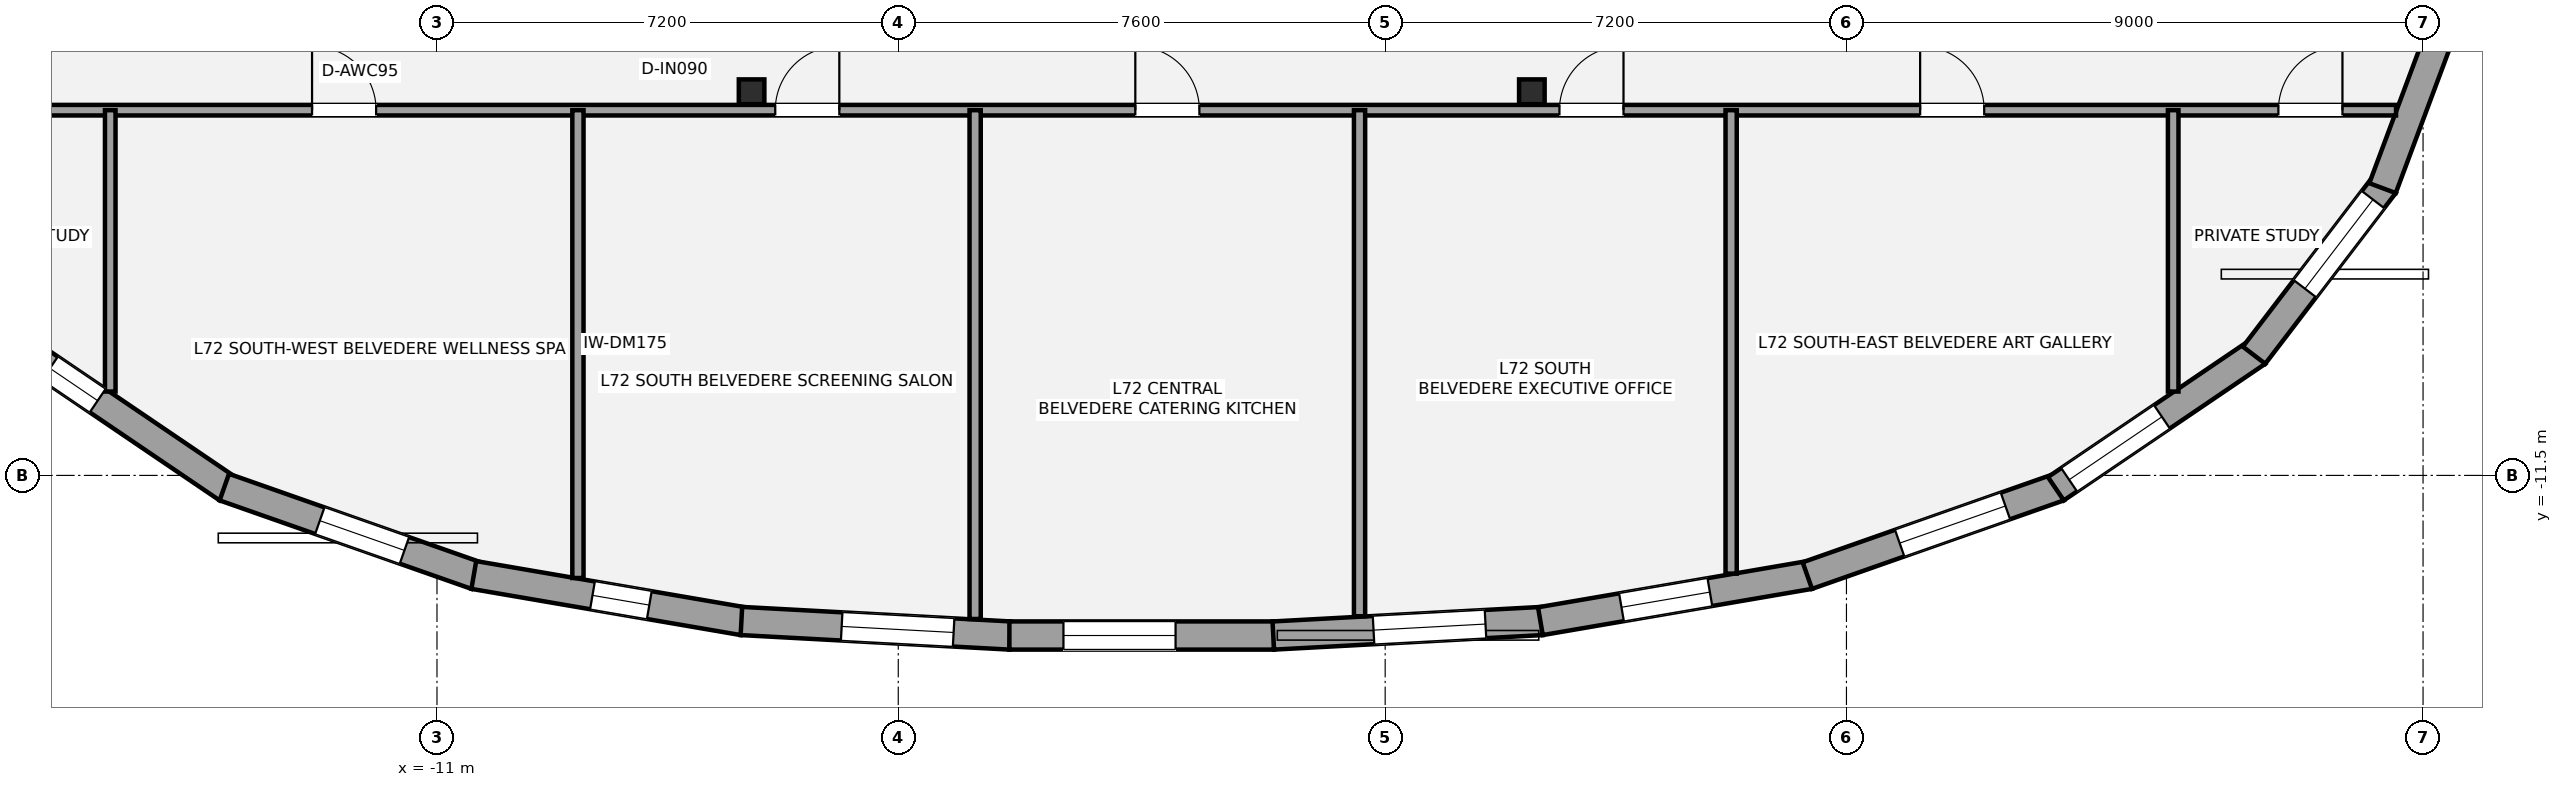
"""IFC4 building model, lengths in metres.
Left out: names, types, materials, properties, quantities, classifications, styles, units other than length and angle.
Written with IfcOpenShell. Run it as: python <this file> out.ifc"""

import sys

from ifc_helpers import new_model, si_unit, direction, frame, frame_2d, origin, origin_2d, place, context, subcontext, project, spatial, rectangle, i_section, extrude, element, fill, save


model = new_model("IFC4")
c1 = context("Model", 3, precision=1e-05, world=origin(), true_north=direction((0.0, 1.0)))
c2 = subcontext(c1, "Body", "Model", "MODEL_VIEW")
j1 = project(units=[si_unit("LENGTHUNIT", "METRE"), si_unit("PLANEANGLEUNIT", "RADIAN")], contexts=[c1])
p1 = place(None, origin())
s1 = spatial("IfcSite", under=j1, at=p1, CompositionType="ELEMENT")
p2 = place(p1, origin())
s2 = spatial("IfcBuilding", under=s1, at=p2, CompositionType="ELEMENT")
p3 = place(p2, frame((0.0, 0.0, 254.1)))
s3 = spatial("IfcBuildingStorey", under=s2, at=p3, CompositionType="ELEMENT", Elevation=254.1)
for number, where, z_axis, x_axis in (
    (1, (-6.09, -5.513, 0.0), (0.0, 0.0, 1.0), (1.0, 0.0, 0.0)),
    (2, (6.09, -5.513, 0.0), (0.0, 0.0, 1.0), (1.0, 0.0, 0.0)),
):
    element("IfcColumn", number, at=place(p3, frame(where, z_axis=z_axis, x_axis=x_axis)), inside=s3, PredefinedType="COLUMN", context=c2, shape_type="SweptSolid", body=[
        extrude(i_section(OverallWidth=0.399, OverallDepth=0.387, WebThickness=0.021, FlangeThickness=0.033, at=origin_2d()), origin(), (0.0, 0.0, 1.0), 3.15),
    ])
p4 = place(p3, frame((-14.269, -11.708, 0.0), z_axis=(0.0, 0.0, 1.0), x_axis=(-0.827695346596, 0.561177702001, 0.0)))
e3 = element("IfcWall", 3, at=p4, inside=s3, PredefinedType="STANDARD", context=c2, shape_type="SweptSolid", body=[
    extrude(rectangle(XDim=3.8, YDim=0.44, at=frame_2d((1.9, 0.0))), origin(), (0.0, 0.0, 1.0), 2.336),
])
p5 = place(p4, frame((2.449, 0.0, 0.58)))
e4 = element("IfcOpeningElement", 4, at=p5, cuts=e3, PredefinedType="OPENING", context=c2, shape_type="SweptSolid", body=[
    extrude(rectangle(XDim=0.9, YDim=1.35, at=frame_2d((0.45, 0.675))), frame((0.0, 0.23, 0.0), z_axis=(0.0, -1.0, 0.0), x_axis=(1.0, 0.0, 0.0)), (0.0, 0.0, 1.0), 0.46),
])
p6 = place(p3, frame((-10.389, -13.063, 0.0), z_axis=(0.0, 0.0, 1.0), x_axis=(-0.943461130408, 0.331483175152, 0.0)))
e5 = element("IfcWall", 5, at=p6, inside=s3, PredefinedType="STANDARD", context=c2, shape_type="SweptSolid", body=[
    extrude(rectangle(XDim=4.166, YDim=0.44, at=frame_2d((2.083, 0.0))), origin(), (0.0, 0.0, 1.0), 2.336),
])
p7 = place(p6, frame((1.186, 0.0, 0.55)))
e6 = element("IfcOpeningElement", 6, at=p7, cuts=e5, PredefinedType="OPENING", context=c2, shape_type="SweptSolid", body=[
    extrude(rectangle(XDim=1.4, YDim=1.55, at=frame_2d((0.7, 0.775))), frame((0.0, 0.23, 0.0), z_axis=(0.0, -1.0, 0.0), x_axis=(1.0, 0.0, 0.0)), (0.0, 0.0, 1.0), 0.46),
])
p8 = place(p3, frame((-6.223, -13.775, 0.0), z_axis=(0.0, 0.0, 1.0), x_axis=(-0.985601268854, 0.169086187587, 0.0)))
e7 = element("IfcWall", 7, at=p8, inside=s3, PredefinedType="STANDARD", context=c2, shape_type="SweptSolid", body=[
    extrude(rectangle(XDim=4.264, YDim=0.44, at=frame_2d((2.132, 0.0))), origin(), (0.0, 0.0, 1.0), 2.336),
])
p9 = place(p8, frame((1.484, 0.0, 0.58)))
e8 = element("IfcOpeningElement", 8, at=p9, cuts=e7, PredefinedType="OPENING", context=c2, shape_type="SweptSolid", body=[
    extrude(rectangle(XDim=0.9, YDim=1.35, at=frame_2d((0.45, 0.675))), frame((0.0, 0.23, 0.0), z_axis=(0.0, -1.0, 0.0), x_axis=(1.0, 0.0, 0.0)), (0.0, 0.0, 1.0), 0.46),
])
p10 = place(p3, frame((-2.054, -13.999, 0.0), z_axis=(0.0, 0.0, 1.0), x_axis=(-0.998541341871, 0.05399248627, 0.0)))
e9 = element("IfcWall", 9, at=p10, inside=s3, PredefinedType="STANDARD", context=c2, shape_type="SweptSolid", body=[
    extrude(rectangle(XDim=4.201, YDim=0.44, at=frame_2d((2.1, 0.0))), origin(), (0.0, 0.0, 1.0), 2.336),
])
p11 = place(p10, frame((0.884, 0.0, 0.55)))
e10 = element("IfcOpeningElement", 10, at=p11, cuts=e9, PredefinedType="OPENING", context=c2, shape_type="SweptSolid", body=[
    extrude(rectangle(XDim=1.75, YDim=1.55, at=frame_2d((0.875, 0.775))), frame((0.0, 0.23, 0.0), z_axis=(0.0, -1.0, 0.0), x_axis=(1.0, 0.0, 0.0)), (0.0, 0.0, 1.0), 0.46),
])
p12 = place(p3, frame((2.065, -13.999, 0.0), z_axis=(0.0, 0.0, 1.0), x_axis=(-1.0, 0.0, 0.0)))
e11 = element("IfcWall", 11, at=p12, inside=s3, PredefinedType="STANDARD", context=c2, shape_type="SweptSolid", body=[
    extrude(rectangle(XDim=4.131, YDim=0.44, at=frame_2d((2.065, 0.0))), origin(), (0.0, 0.0, 1.0), 2.336),
])
p13 = place(p12, frame((1.537, 0.0, 0.55)))
e12 = element("IfcOpeningElement", 12, at=p13, cuts=e11, PredefinedType="OPENING", context=c2, shape_type="SweptSolid", body=[
    extrude(rectangle(XDim=1.75, YDim=1.55, at=frame_2d((0.875, 0.775))), frame((0.0, 0.23, 0.0), z_axis=(0.0, -1.0, 0.0), x_axis=(1.0, 0.0, 0.0)), (0.0, 0.0, 1.0), 0.46),
])
p14 = place(p3, frame((6.248, -13.772, 0.0), z_axis=(0.0, 0.0, 1.0), x_axis=(-0.998541341871, -0.05399248627, 0.0)))
e13 = element("IfcWall", 13, at=p14, inside=s3, PredefinedType="STANDARD", context=c2, shape_type="SweptSolid", body=[
    extrude(rectangle(XDim=4.201, YDim=0.44, at=frame_2d((2.1, 0.0))), origin(), (0.0, 0.0, 1.0), 2.336),
])
p15 = place(p14, frame((0.884, 0.0, 0.55)))
e14 = element("IfcOpeningElement", 14, at=p15, cuts=e13, PredefinedType="OPENING", context=c2, shape_type="SweptSolid", body=[
    extrude(rectangle(XDim=1.75, YDim=1.55, at=frame_2d((0.875, 0.775))), frame((0.0, 0.23, 0.0), z_axis=(0.0, -1.0, 0.0), x_axis=(1.0, 0.0, 0.0)), (0.0, 0.0, 1.0), 0.46),
])
p16 = place(p3, frame((10.425, -13.054, 0.0), z_axis=(0.0, 0.0, 1.0), x_axis=(-0.985601268854, -0.169086187587, 0.0)))
e15 = element("IfcWall", 15, at=p16, inside=s3, PredefinedType="STANDARD", context=c2, shape_type="SweptSolid", body=[
    extrude(rectangle(XDim=4.264, YDim=0.44, at=frame_2d((2.132, 0.0))), origin(), (0.0, 0.0, 1.0), 2.336),
])
p17 = place(p16, frame((1.58, 0.0, 0.55)))
e16 = element("IfcOpeningElement", 16, at=p17, cuts=e15, PredefinedType="OPENING", context=c2, shape_type="SweptSolid", body=[
    extrude(rectangle(XDim=1.4, YDim=1.55, at=frame_2d((0.7, 0.775))), frame((0.0, 0.23, 0.0), z_axis=(0.0, -1.0, 0.0), x_axis=(1.0, 0.0, 0.0)), (0.0, 0.0, 1.0), 0.46),
])
p18 = place(p3, frame((14.32, -11.683, 0.0), z_axis=(0.0, 0.0, 1.0), x_axis=(-0.943461130408, -0.331483175152, 0.0)))
e17 = element("IfcWall", 17, at=p18, inside=s3, PredefinedType="STANDARD", context=c2, shape_type="SweptSolid", body=[
    extrude(rectangle(XDim=4.166, YDim=0.44, at=frame_2d((2.083, 0.0))), origin(), (0.0, 0.0, 1.0), 2.336),
])
p19 = place(p18, frame((0.888, 0.0, 0.55)))
e18 = element("IfcOpeningElement", 18, at=p19, cuts=e17, PredefinedType="OPENING", context=c2, shape_type="SweptSolid", body=[
    extrude(rectangle(XDim=1.75, YDim=1.55, at=frame_2d((0.875, 0.775))), frame((0.0, 0.23, 0.0), z_axis=(0.0, -1.0, 0.0), x_axis=(1.0, 0.0, 0.0)), (0.0, 0.0, 1.0), 0.46),
])
p20 = place(p3, frame((17.414, -9.576, 0.0), z_axis=(0.0, 0.0, 1.0), x_axis=(-0.827695346596, -0.561177702001, 0.0)))
e19 = element("IfcWall", 19, at=p20, inside=s3, PredefinedType="STANDARD", context=c2, shape_type="SweptSolid", body=[
    extrude(rectangle(XDim=3.8, YDim=0.44, at=frame_2d((1.9, 0.0))), origin(), (0.0, 0.0, 1.0), 2.336),
])
p21 = place(p20, frame((1.8, 0.0, 0.55)))
e20 = element("IfcOpeningElement", 20, at=p21, cuts=e19, PredefinedType="OPENING", context=c2, shape_type="SweptSolid", body=[
    extrude(rectangle(XDim=1.75, YDim=1.55, at=frame_2d((0.875, 0.775))), frame((0.0, 0.23, 0.0), z_axis=(0.0, -1.0, 0.0), x_axis=(1.0, 0.0, 0.0)), (0.0, 0.0, 1.0), 0.46),
])
p22 = place(p3, frame((19.399, -6.96, 0.0), z_axis=(0.0, 0.0, 1.0), x_axis=(-0.607266352304, -0.794498318034, 0.0)))
e21 = element("IfcWall", 21, at=p22, inside=s3, PredefinedType="STANDARD", context=c2, shape_type="SweptSolid", body=[
    extrude(rectangle(XDim=3.354, YDim=0.44, at=frame_2d((1.677, 0.0))), origin(), (0.0, 0.0, 1.0), 2.336),
])
p23 = place(p22, frame((0.296, 0.0, 0.55)))
e22 = element("IfcOpeningElement", 22, at=p23, cuts=e21, PredefinedType="OPENING", context=c2, shape_type="SweptSolid", body=[
    extrude(rectangle(XDim=1.75, YDim=1.55, at=frame_2d((0.875, 0.775))), frame((0.0, 0.23, 0.0), z_axis=(0.0, -1.0, 0.0), x_axis=(1.0, 0.0, 0.0)), (0.0, 0.0, 1.0), 0.46),
])
p24 = place(p3, frame((20.431, -4.167, 0.0), z_axis=(0.0, 0.0, 1.0), x_axis=(-0.349627332297, -0.936888856007, 0.0)))
e23 = element("IfcWall", 23, at=p24, inside=s3, PredefinedType="STANDARD", context=c2, shape_type="SweptSolid", body=[
    extrude(rectangle(XDim=3.041, YDim=0.44, at=frame_2d((1.521, 0.0))), origin(), (0.0, 0.0, 1.0), 2.336),
])
p25 = place(p3, frame((-19.578, -5.8, 0.0), z_axis=(0.0, 0.0, 1.0), x_axis=(1.0, 0.0, 0.0)))
e24 = element("IfcWall", 24, at=p25, inside=s3, PredefinedType="PARTITIONING", context=c2, shape_type="SweptSolid", body=[
    extrude(rectangle(XDim=39.157, YDim=0.165, at=frame_2d((19.578, 0.0))), origin(), (0.0, 0.0, 1.0), 2.423),
])
p26 = place(p25, frame((1.076, 0.0, 0.0)))
e25 = element("IfcOpeningElement", 25, at=p26, cuts=e24, PredefinedType="OPENING", context=c2, shape_type="SweptSolid", body=[
    extrude(rectangle(XDim=1.0, YDim=2.15, at=frame_2d((0.5, 1.075))), frame((0.0, 0.093, 0.0), z_axis=(0.0, -1.0, 0.0), x_axis=(1.0, 0.0, 0.0)), (0.0, 0.0, 1.0), 0.185),
])
p27 = place(p25, frame((37.32, 0.0, 0.0)))
e26 = element("IfcOpeningElement", 26, at=p27, cuts=e24, PredefinedType="OPENING", context=c2, shape_type="SweptSolid", body=[
    extrude(rectangle(XDim=1.0, YDim=2.15, at=frame_2d((0.5, 1.075))), frame((0.0, 0.093, 0.0), z_axis=(0.0, -1.0, 0.0), x_axis=(1.0, 0.0, 0.0)), (0.0, 0.0, 1.0), 0.185),
])
p28 = place(p25, frame((6.628, 0.0, 0.0)))
e27 = element("IfcOpeningElement", 27, at=p28, cuts=e24, PredefinedType="OPENING", context=c2, shape_type="SweptSolid", body=[
    extrude(rectangle(XDim=1.0, YDim=2.15, at=frame_2d((0.5, 1.075))), frame((0.0, 0.093, 0.0), z_axis=(0.0, -1.0, 0.0), x_axis=(1.0, 0.0, 0.0)), (0.0, 0.0, 1.0), 0.185),
])
p29 = place(p25, frame((13.858, 0.0, 0.0)))
e28 = element("IfcOpeningElement", 28, at=p29, cuts=e24, PredefinedType="OPENING", context=c2, shape_type="SweptSolid", body=[
    extrude(rectangle(XDim=1.0, YDim=2.15, at=frame_2d((0.5, 1.075))), frame((0.0, 0.093, 0.0), z_axis=(0.0, -1.0, 0.0), x_axis=(1.0, 0.0, 0.0)), (0.0, 0.0, 1.0), 0.185),
])
p30 = place(p25, frame((19.478, 0.0, 0.0)))
e29 = element("IfcOpeningElement", 29, at=p30, cuts=e24, PredefinedType="OPENING", context=c2, shape_type="SweptSolid", body=[
    extrude(rectangle(XDim=1.0, YDim=2.15, at=frame_2d((0.5, 1.075))), frame((0.0, 0.093, 0.0), z_axis=(0.0, -1.0, 0.0), x_axis=(1.0, 0.0, 0.0)), (0.0, 0.0, 1.0), 0.185),
])
p31 = place(p25, frame((26.098, 0.0, 0.0)))
e30 = element("IfcOpeningElement", 30, at=p31, cuts=e24, PredefinedType="OPENING", context=c2, shape_type="SweptSolid", body=[
    extrude(rectangle(XDim=1.0, YDim=2.15, at=frame_2d((0.5, 1.075))), frame((0.0, 0.093, 0.0), z_axis=(0.0, -1.0, 0.0), x_axis=(1.0, 0.0, 0.0)), (0.0, 0.0, 1.0), 0.185),
])
p32 = place(p25, frame((31.728, 0.0, 0.0)))
e31 = element("IfcOpeningElement", 31, at=p32, cuts=e24, PredefinedType="OPENING", context=c2, shape_type="SweptSolid", body=[
    extrude(rectangle(XDim=1.0, YDim=2.15, at=frame_2d((0.5, 1.075))), frame((0.0, 0.093, 0.0), z_axis=(0.0, -1.0, 0.0), x_axis=(1.0, 0.0, 0.0)), (0.0, 0.0, 1.0), 0.185),
])
for number, where, z_axis, x_axis in (
    (32, (-16.1, -10.191, 0.0), (0.0, 0.0, 1.0), (0.0, 1.0, 0.0)),
    (33, (16.1, -10.191, 0.0), (0.0, 0.0, 1.0), (0.0, 1.0, 0.0)),
):
    element("IfcWall", number, at=place(p3, frame(where, z_axis=z_axis, x_axis=x_axis)), inside=s3, PredefinedType="PARTITIONING", context=c2, shape_type="SweptSolid", body=[
        extrude(rectangle(XDim=4.391, YDim=0.165, at=frame_2d((2.196, 0.0))), origin(), (0.0, 0.0, 1.0), 2.423),
    ])
p33 = place(p3, frame((-8.8, -13.102, 0.0), z_axis=(0.0, 0.0, 1.0), x_axis=(0.0, 1.0, 0.0)))
e34 = element("IfcWall", 34, at=p33, inside=s3, PredefinedType="PARTITIONING", context=c2, shape_type="SweptSolid", body=[
    extrude(rectangle(XDim=7.302, YDim=0.175, at=frame_2d((3.651, 0.0))), origin(), (0.0, 0.0, 1.0), 2.97),
])
p34 = place(p3, frame((-2.6, -13.741, 0.0), z_axis=(0.0, 0.0, 1.0), x_axis=(0.0, 1.0, 0.0)))
e35 = element("IfcWall", 35, at=p34, inside=s3, PredefinedType="PARTITIONING", context=c2, shape_type="SweptSolid", body=[
    extrude(rectangle(XDim=7.941, YDim=0.175, at=frame_2d((3.971, 0.0))), origin(), (0.0, 0.0, 1.0), 2.423),
])
p35 = place(p3, frame((3.4, -13.698, 0.0), z_axis=(0.0, 0.0, 1.0), x_axis=(0.0, 1.0, 0.0)))
e36 = element("IfcWall", 36, at=p35, inside=s3, PredefinedType="PARTITIONING", context=c2, shape_type="SweptSolid", body=[
    extrude(rectangle(XDim=7.898, YDim=0.175, at=frame_2d((3.949, 0.0))), origin(), (0.0, 0.0, 1.0), 2.423),
])
p36 = place(p3, frame((9.2, -13.033, 0.0), z_axis=(0.0, 0.0, 1.0), x_axis=(0.0, 1.0, 0.0)))
e37 = element("IfcWall", 37, at=p36, inside=s3, PredefinedType="PARTITIONING", context=c2, shape_type="SweptSolid", body=[
    extrude(rectangle(XDim=7.233, YDim=0.175, at=frame_2d((3.617, 0.0))), origin(), (0.0, 0.0, 1.0), 2.97),
])
p37 = place(p5, origin())
e38 = element("IfcWindow", 38, at=p37, inside=s3, PartitioningType="SINGLE_PANEL", PredefinedType="WINDOW", context=c2, shape_type="SweptSolid", body=[
    extrude(rectangle(XDim=0.9, YDim=1.35, at=frame_2d((0.45, 0.675))), frame((0.0, -0.01, 0.0), z_axis=(0.0, -1.0, 0.0), x_axis=(1.0, 0.0, 0.0)), (0.0, 0.0, 1.0), 0.06),
])
fill(e4, e38)
p38 = place(p7, origin())
e39 = element("IfcWindow", 39, at=p38, inside=s3, PartitioningType="SINGLE_PANEL", PredefinedType="WINDOW", context=c2, shape_type="SweptSolid", body=[
    extrude(rectangle(XDim=1.4, YDim=1.55, at=frame_2d((0.7, 0.775))), frame((0.0, -0.01, 0.0), z_axis=(0.0, -1.0, 0.0), x_axis=(1.0, 0.0, 0.0)), (0.0, 0.0, 1.0), 0.06),
])
fill(e6, e39)
p39 = place(p9, origin())
e40 = element("IfcWindow", 40, at=p39, inside=s3, PartitioningType="SINGLE_PANEL", PredefinedType="WINDOW", context=c2, shape_type="SweptSolid", body=[
    extrude(rectangle(XDim=0.9, YDim=1.35, at=frame_2d((0.45, 0.675))), frame((0.0, -0.01, 0.0), z_axis=(0.0, -1.0, 0.0), x_axis=(1.0, 0.0, 0.0)), (0.0, 0.0, 1.0), 0.06),
])
fill(e8, e40)
p40 = place(p11, origin())
e41 = element("IfcWindow", 41, at=p40, inside=s3, PartitioningType="SINGLE_PANEL", PredefinedType="WINDOW", context=c2, shape_type="SweptSolid", body=[
    extrude(rectangle(XDim=1.75, YDim=1.55, at=frame_2d((0.875, 0.775))), frame((0.0, -0.01, 0.0), z_axis=(0.0, -1.0, 0.0), x_axis=(1.0, 0.0, 0.0)), (0.0, 0.0, 1.0), 0.06),
])
fill(e10, e41)
p41 = place(p13, origin())
e42 = element("IfcWindow", 42, at=p41, inside=s3, PartitioningType="SINGLE_PANEL", PredefinedType="WINDOW", context=c2, shape_type="SweptSolid", body=[
    extrude(rectangle(XDim=1.75, YDim=1.55, at=frame_2d((0.875, 0.775))), frame((0.0, -0.01, 0.0), z_axis=(0.0, -1.0, 0.0), x_axis=(1.0, 0.0, 0.0)), (0.0, 0.0, 1.0), 0.06),
])
fill(e12, e42)
p42 = place(p15, origin())
e43 = element("IfcWindow", 43, at=p42, inside=s3, PartitioningType="SINGLE_PANEL", PredefinedType="WINDOW", context=c2, shape_type="SweptSolid", body=[
    extrude(rectangle(XDim=1.75, YDim=1.55, at=frame_2d((0.875, 0.775))), frame((0.0, -0.01, 0.0), z_axis=(0.0, -1.0, 0.0), x_axis=(1.0, 0.0, 0.0)), (0.0, 0.0, 1.0), 0.06),
])
fill(e14, e43)
p43 = place(p17, origin())
e44 = element("IfcWindow", 44, at=p43, inside=s3, PartitioningType="SINGLE_PANEL", PredefinedType="WINDOW", context=c2, shape_type="SweptSolid", body=[
    extrude(rectangle(XDim=1.4, YDim=1.55, at=frame_2d((0.7, 0.775))), frame((0.0, -0.01, 0.0), z_axis=(0.0, -1.0, 0.0), x_axis=(1.0, 0.0, 0.0)), (0.0, 0.0, 1.0), 0.06),
])
fill(e16, e44)
p44 = place(p19, origin())
e45 = element("IfcWindow", 45, at=p44, inside=s3, PartitioningType="SINGLE_PANEL", PredefinedType="WINDOW", context=c2, shape_type="SweptSolid", body=[
    extrude(rectangle(XDim=1.75, YDim=1.55, at=frame_2d((0.875, 0.775))), frame((0.0, -0.01, 0.0), z_axis=(0.0, -1.0, 0.0), x_axis=(1.0, 0.0, 0.0)), (0.0, 0.0, 1.0), 0.06),
])
fill(e18, e45)
p45 = place(p21, origin())
e46 = element("IfcWindow", 46, at=p45, inside=s3, PartitioningType="SINGLE_PANEL", PredefinedType="WINDOW", context=c2, shape_type="SweptSolid", body=[
    extrude(rectangle(XDim=1.75, YDim=1.55, at=frame_2d((0.875, 0.775))), frame((0.0, -0.01, 0.0), z_axis=(0.0, -1.0, 0.0), x_axis=(1.0, 0.0, 0.0)), (0.0, 0.0, 1.0), 0.06),
])
fill(e20, e46)
p46 = place(p23, origin())
e47 = element("IfcWindow", 47, at=p46, inside=s3, PartitioningType="SINGLE_PANEL", PredefinedType="WINDOW", context=c2, shape_type="SweptSolid", body=[
    extrude(rectangle(XDim=1.75, YDim=1.55, at=frame_2d((0.875, 0.775))), frame((0.0, -0.01, 0.0), z_axis=(0.0, -1.0, 0.0), x_axis=(1.0, 0.0, 0.0)), (0.0, 0.0, 1.0), 0.06),
])
fill(e22, e47)
p47 = place(p27, origin())
e48 = element("IfcDoor", 48, at=p47, inside=s3, OperationType="SINGLE_SWING_RIGHT", PredefinedType="DOOR", context=c2, shape_type="SweptSolid", body=[
    extrude(rectangle(XDim=1.0, YDim=2.15, at=frame_2d((0.5, 1.075))), frame((0.0, 0.025, 0.0), z_axis=(0.0, -1.0, 0.0), x_axis=(1.0, 0.0, 0.0)), (0.0, 0.0, 1.0), 0.05),
])
fill(e26, e48)
p48 = place(p28, origin())
e49 = element("IfcDoor", 49, at=p48, inside=s3, OperationType="SINGLE_SWING_LEFT", PredefinedType="DOOR", context=c2, shape_type="SweptSolid", body=[
    extrude(rectangle(XDim=1.0, YDim=2.15, at=frame_2d((0.5, 1.075))), frame((0.0, 0.025, 0.0), z_axis=(0.0, -1.0, 0.0), x_axis=(1.0, 0.0, 0.0)), (0.0, 0.0, 1.0), 0.05),
])
fill(e27, e49)
p49 = place(p29, origin())
e50 = element("IfcDoor", 50, at=p49, inside=s3, OperationType="SINGLE_SWING_RIGHT", PredefinedType="DOOR", context=c2, shape_type="SweptSolid", body=[
    extrude(rectangle(XDim=1.0, YDim=2.15, at=frame_2d((0.5, 1.075))), frame((0.0, 0.025, 0.0), z_axis=(0.0, -1.0, 0.0), x_axis=(1.0, 0.0, 0.0)), (0.0, 0.0, 1.0), 0.05),
])
fill(e28, e50)
p50 = place(p30, origin())
e51 = element("IfcDoor", 51, at=p50, inside=s3, OperationType="SINGLE_SWING_LEFT", PredefinedType="DOOR", context=c2, shape_type="SweptSolid", body=[
    extrude(rectangle(XDim=1.0, YDim=2.15, at=frame_2d((0.5, 1.075))), frame((0.0, 0.025, 0.0), z_axis=(0.0, -1.0, 0.0), x_axis=(1.0, 0.0, 0.0)), (0.0, 0.0, 1.0), 0.05),
])
fill(e29, e51)
p51 = place(p31, origin())
e52 = element("IfcDoor", 52, at=p51, inside=s3, OperationType="SINGLE_SWING_RIGHT", PredefinedType="DOOR", context=c2, shape_type="SweptSolid", body=[
    extrude(rectangle(XDim=1.0, YDim=2.15, at=frame_2d((0.5, 1.075))), frame((0.0, 0.025, 0.0), z_axis=(0.0, -1.0, 0.0), x_axis=(1.0, 0.0, 0.0)), (0.0, 0.0, 1.0), 0.05),
])
fill(e30, e52)
p52 = place(p32, origin())
e53 = element("IfcDoor", 53, at=p52, inside=s3, OperationType="SINGLE_SWING_LEFT", PredefinedType="DOOR", context=c2, shape_type="SweptSolid", body=[
    extrude(rectangle(XDim=1.0, YDim=2.15, at=frame_2d((0.5, 1.075))), frame((0.0, 0.025, 0.0), z_axis=(0.0, -1.0, 0.0), x_axis=(1.0, 0.0, 0.0)), (0.0, 0.0, 1.0), 0.05),
])
fill(e31, e53)
save(model, sys.argv[1])
